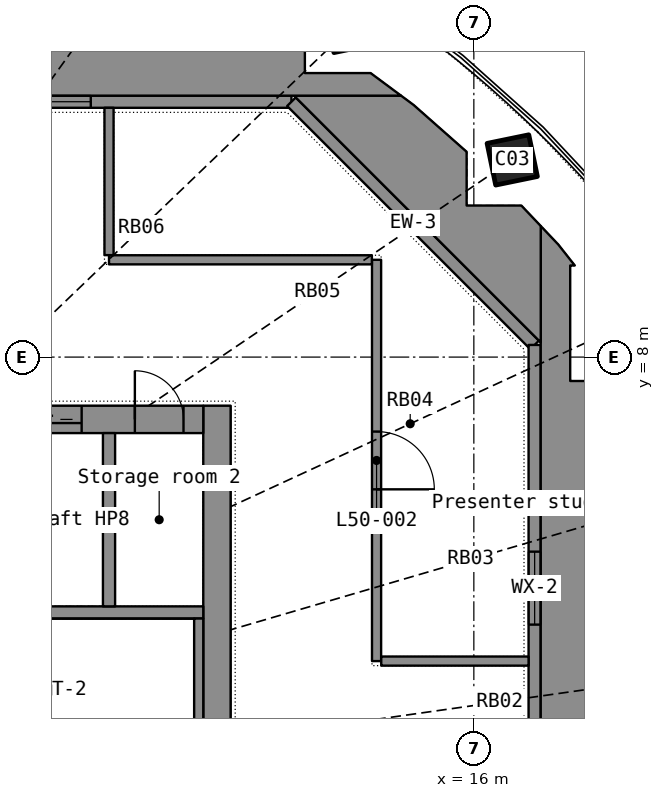
"""IFC4 building model, lengths in metres.
Left out: names, types, materials, properties, quantities, classifications, styles, units other than length and angle.
Written with IfcOpenShell. Run it as: python <this file> out.ifc"""

import sys

from ifc_helpers import new_model, si_unit, direction, frame, frame_2d, origin, origin_2d, place, context, subcontext, project, spatial, polyline, rectangle, hollow_rectangle, outline, extrude, element, fill, save


model = new_model("IFC4")
c1 = context("Model", 3, precision=1e-05, world=origin(), true_north=direction((0.0, 1.0)))
c2 = subcontext(c1, "Body", "Model", "MODEL_VIEW")
j1 = project(units=[si_unit("LENGTHUNIT", "METRE"), si_unit("PLANEANGLEUNIT", "RADIAN")], contexts=[c1])
p1 = place(None, origin())
s1 = spatial("IfcSite", under=j1, at=p1, CompositionType="ELEMENT")
p2 = place(p1, origin())
s2 = spatial("IfcBuilding", under=s1, at=p2, CompositionType="ELEMENT")
p3 = place(p2, frame((0.0, 0.0, 205.2)))
s3 = spatial("IfcBuildingStorey", under=s2, at=p3, CompositionType="ELEMENT", Elevation=205.2)
p4 = place(p3, frame((18.535, 8.557, 0.0), z_axis=(-0.029972624, -0.014178469, 0.999450155), x_axis=(0.583640912, -0.811989828, 0.005983767)))
e1 = element("IfcColumn", 1, at=p4, inside=s3, PredefinedType="COLUMN", context=c2, shape_type="SweptSolid", body=[
    extrude(hollow_rectangle(XDim=1.1, YDim=1.1, WallThickness=0.032, at=origin_2d()), origin(), (0.0, 0.0, 1.0), 7.404),
])
p5 = place(p3, frame((16.631, 11.243, 0.0), z_axis=(-0.026511305, -0.018201791, 0.999482789), x_axis=(0.720516136, -0.693407857, 0.006483911)))
e2 = element("IfcColumn", 2, at=p5, inside=s3, PredefinedType="COLUMN", context=c2, shape_type="SweptSolid", body=[
    extrude(hollow_rectangle(XDim=0.7, YDim=0.7, WallThickness=0.025, at=origin_2d()), origin(), (0.0, 0.0, 1.0), 7.404),
])
p6 = place(p3, frame((13.971, 13.421, 0.0), z_axis=(-0.022258382, -0.021697801, 0.999516768), x_axis=(0.828160065, -0.560456529, 0.006275862)))
e3 = element("IfcColumn", 3, at=p6, inside=s3, PredefinedType="COLUMN", context=c2, shape_type="SweptSolid", body=[
    extrude(hollow_rectangle(XDim=0.7, YDim=0.7, WallThickness=0.025, at=origin_2d()), origin(), (0.0, 0.0, 1.0), 7.404),
])
p7 = place(p3, frame((-13.0, 12.2, 0.08), z_axis=(0.0, 0.0, 1.0), x_axis=(1.0, 0.0, 0.0)))
e4 = element("IfcWall", 4, at=p7, inside=s3, PredefinedType="STANDARD", context=c2, shape_type="SweptSolid", body=[
    extrude(rectangle(XDim=26.0, YDim=0.2, at=frame_2d((13.0, 0.0))), origin(), (0.0, 0.0, 1.0), 7.12),
])
p8 = place(p7, frame((7.1, 0.0, 0.0)))
e5 = element("IfcOpeningElement", 5, at=p8, cuts=e4, PredefinedType="OPENING", context=c2, shape_type="SweptSolid", body=[
    extrude(rectangle(XDim=1.8, YDim=2.4, at=frame_2d((0.9, 1.2))), frame((0.0, 0.11, 0.0), z_axis=(0.0, -1.0, 0.0), x_axis=(1.0, 0.0, 0.0)), (0.0, 0.0, 1.0), 0.22),
])
p9 = place(p7, frame((17.1, 0.0, 0.0)))
e6 = element("IfcOpeningElement", 6, at=p9, cuts=e4, PredefinedType="OPENING", context=c2, shape_type="SweptSolid", body=[
    extrude(rectangle(XDim=1.8, YDim=2.4, at=frame_2d((0.9, 1.2))), frame((0.0, 0.11, 0.0), z_axis=(0.0, -1.0, 0.0), x_axis=(1.0, 0.0, 0.0)), (0.0, 0.0, 1.0), 0.22),
])
p10 = place(p7, frame((3.3, 0.0, 0.9)))
e7 = element("IfcOpeningElement", 7, at=p10, cuts=e4, PredefinedType="OPENING", context=c2, shape_type="SweptSolid", body=[
    extrude(rectangle(XDim=2.4, YDim=1.5, at=frame_2d((1.2, 0.75))), frame((0.0, 0.11, 0.0), z_axis=(0.0, -1.0, 0.0), x_axis=(1.0, 0.0, 0.0)), (0.0, 0.0, 1.0), 0.22),
])
p11 = place(p7, frame((11.8, 0.0, 0.9)))
e8 = element("IfcOpeningElement", 8, at=p11, cuts=e4, PredefinedType="OPENING", context=c2, shape_type="SweptSolid", body=[
    extrude(rectangle(XDim=2.4, YDim=1.5, at=frame_2d((1.2, 0.75))), frame((0.0, 0.11, 0.0), z_axis=(0.0, -1.0, 0.0), x_axis=(1.0, 0.0, 0.0)), (0.0, 0.0, 1.0), 0.22),
])
p12 = place(p7, frame((20.3, 0.0, 0.9)))
e9 = element("IfcOpeningElement", 9, at=p12, cuts=e4, PredefinedType="OPENING", context=c2, shape_type="SweptSolid", body=[
    extrude(rectangle(XDim=2.4, YDim=1.5, at=frame_2d((1.2, 0.75))), frame((0.0, 0.11, 0.0), z_axis=(0.0, -1.0, 0.0), x_axis=(1.0, 0.0, 0.0)), (0.0, 0.0, 1.0), 0.22),
])
p13 = place(p7, frame((6.5, 0.0, 3.2)))
e10 = element("IfcOpeningElement", 10, at=p13, cuts=e4, PredefinedType="OPENING", context=c2, shape_type="SweptSolid", body=[
    extrude(rectangle(XDim=3.0, YDim=1.0, at=frame_2d((1.5, 0.5))), frame((0.0, 0.11, 0.0), z_axis=(0.0, -1.0, 0.0), x_axis=(1.0, 0.0, 0.0)), (0.0, 0.0, 1.0), 0.22),
])
p14 = place(p7, frame((16.5, 0.0, 3.2)))
e11 = element("IfcOpeningElement", 11, at=p14, cuts=e4, PredefinedType="OPENING", context=c2, shape_type="SweptSolid", body=[
    extrude(rectangle(XDim=3.0, YDim=1.0, at=frame_2d((1.5, 0.5))), frame((0.0, 0.11, 0.0), z_axis=(0.0, -1.0, 0.0), x_axis=(1.0, 0.0, 0.0)), (0.0, 0.0, 1.0), 0.22),
])
p15 = place(p3, frame((13.0, 12.2, 0.08), z_axis=(0.0, 0.0, 1.0), x_axis=(0.707106781, -0.707106781, 0.0)))
e12 = element("IfcWall", 12, at=p15, inside=s3, PredefinedType="STANDARD", context=c2, shape_type="SweptSolid", body=[
    extrude(rectangle(XDim=5.657, YDim=0.2, at=frame_2d((2.828, 0.0))), origin(), (0.0, 0.0, 1.0), 7.12),
])
p16 = place(p3, frame((17.0, 8.2, 0.08), z_axis=(0.0, 0.0, 1.0), x_axis=(0.0, -1.0, 0.0)))
e13 = element("IfcWall", 13, at=p16, inside=s3, PredefinedType="STANDARD", context=c2, shape_type="SweptSolid", body=[
    extrude(rectangle(XDim=16.4, YDim=0.2, at=frame_2d((8.2, 0.0))), origin(), (0.0, 0.0, 1.0), 7.12),
])
p17 = place(p16, frame((7.3, 0.0, 0.0)))
e14 = element("IfcOpeningElement", 14, at=p17, cuts=e13, PredefinedType="OPENING", context=c2, shape_type="SweptSolid", body=[
    extrude(rectangle(XDim=1.8, YDim=2.4, at=frame_2d((0.9, 1.2))), frame((0.0, 0.11, 0.0), z_axis=(0.0, -1.0, 0.0), x_axis=(1.0, 0.0, 0.0)), (0.0, 0.0, 1.0), 0.22),
])
p18 = place(p16, frame((3.4, 0.0, 0.1)))
e15 = element("IfcOpeningElement", 15, at=p18, cuts=e13, PredefinedType="OPENING", context=c2, shape_type="SweptSolid", body=[
    extrude(rectangle(XDim=1.2, YDim=2.2, at=frame_2d((0.6, 1.1))), frame((0.0, 0.11, 0.0), z_axis=(0.0, -1.0, 0.0), x_axis=(1.0, 0.0, 0.0)), (0.0, 0.0, 1.0), 0.22),
])
p19 = place(p16, frame((11.8, 0.0, 0.1)))
e16 = element("IfcOpeningElement", 16, at=p19, cuts=e13, PredefinedType="OPENING", context=c2, shape_type="SweptSolid", body=[
    extrude(rectangle(XDim=1.2, YDim=2.2, at=frame_2d((0.6, 1.1))), frame((0.0, 0.11, 0.0), z_axis=(0.0, -1.0, 0.0), x_axis=(1.0, 0.0, 0.0)), (0.0, 0.0, 1.0), 0.22),
])
p20 = place(p3, frame((0.0, 0.0, -0.4)))
e17 = element("IfcWall", 17, at=p20, inside=s3, PredefinedType="ELEMENTEDWALL", context=c2, shape_type="SweptSolid", body=[
    extrude(outline(polyline([(17.1, 10.156), (17.1, 8.241), (17.1, 0.9), (20.39, 0.9), (20.39, 0.95), (21.175, 0.95), (21.145, 1.497), (21.019, 2.273), (20.567, 2.273), (20.567, 3.773), (20.687, 3.773), (20.503, 4.446), (20.205, 5.212), (19.606, 5.212), (19.606, 6.54), (19.237, 7.26), (19.014, 7.607), (17.585, 7.607), (17.585, 9.507), (17.66, 9.507), (17.387, 9.853), (17.1, 10.156)])), origin(), (0.0, 0.0, 1.0), 1.58),
])
p21 = place(p3, frame((0.0, 0.0, -0.4)))
e18 = element("IfcWall", 18, at=p21, inside=s3, PredefinedType="ELEMENTEDWALL", context=c2, shape_type="SweptSolid", body=[
    extrude(outline(polyline([(14.803, 12.3), (13.042, 12.3), (17.1, 8.241), (17.1, 10.156), (16.781, 10.493), (15.881, 10.493), (15.881, 11.377), (15.009, 12.147), (14.803, 12.3)])), origin(), (0.0, 0.0, 1.0), 1.58),
])
p22 = place(p3, frame((0.0, 0.0, -0.4)))
e19 = element("IfcWall", 19, at=p22, inside=s3, PredefinedType="ELEMENTEDWALL", context=c2, shape_type="SweptSolid", body=[
    extrude(outline(polyline([(8.97, 15.569), (8.196, 15.829), (8.196, 15.756), (6.696, 15.756), (6.696, 16.286), (5.9, 16.49), (5.9, 12.3), (13.042, 12.3), (14.803, 12.3), (14.302, 12.671), (13.221, 12.671), (13.221, 13.422), (12.175, 14.072), (11.7, 14.317), (11.7, 13.974), (9.8, 13.974), (9.8, 15.22), (8.97, 15.569)])), origin(), (0.0, 0.0, 1.0), 1.58),
])
p23 = place(p3, frame((11.775, -7.2, 0.0), z_axis=(0.0, 0.0, 1.0), x_axis=(0.0, 1.0, 0.0)))
e20 = element("IfcWall", 20, at=p23, inside=s3, PredefinedType="SHEAR", context=c2, shape_type="SweptSolid", body=[
    extrude(rectangle(XDim=14.4, YDim=0.45, at=frame_2d((7.2, 0.0))), origin(), (0.0, 0.0, 1.0), 7.0),
])
p24 = place(p23, frame((6.5, 0.0, 0.0)))
e21 = element("IfcOpeningElement", 21, at=p24, cuts=e20, PredefinedType="OPENING", context=c2, shape_type="SweptSolid", body=[
    extrude(rectangle(XDim=1.4, YDim=2.2, at=frame_2d((0.7, 1.1))), frame((0.0, 0.235, 0.0), z_axis=(0.0, -1.0, 0.0), x_axis=(1.0, 0.0, 0.0)), (0.0, 0.0, 1.0), 0.47),
])
p25 = place(p3, frame((-11.55, 6.975, 0.0), z_axis=(0.0, 0.0, 1.0), x_axis=(1.0, 0.0, 0.0)))
e22 = element("IfcWall", 22, at=p25, inside=s3, PredefinedType="SHEAR", context=c2, shape_type="SweptSolid", body=[
    extrude(rectangle(XDim=23.1, YDim=0.45, at=frame_2d((11.55, 0.0))), origin(), (0.0, 0.0, 1.0), 7.0),
])
p26 = place(p25, frame((2.0, 0.0, 0.0)))
e23 = element("IfcOpeningElement", 23, at=p26, cuts=e22, PredefinedType="OPENING", context=c2, shape_type="SweptSolid", body=[
    extrude(rectangle(XDim=1.1, YDim=2.2, at=frame_2d((0.55, 1.1))), frame((0.0, 0.235, 0.0), z_axis=(0.0, -1.0, 0.0), x_axis=(1.0, 0.0, 0.0)), (0.0, 0.0, 1.0), 0.47),
])
p27 = place(p25, frame((6.0, 0.0, 0.0)))
e24 = element("IfcOpeningElement", 24, at=p27, cuts=e22, PredefinedType="OPENING", context=c2, shape_type="SweptSolid", body=[
    extrude(rectangle(XDim=1.1, YDim=2.2, at=frame_2d((0.55, 1.1))), frame((0.0, 0.235, 0.0), z_axis=(0.0, -1.0, 0.0), x_axis=(1.0, 0.0, 0.0)), (0.0, 0.0, 1.0), 0.47),
])
p28 = place(p25, frame((8.0, 0.0, 0.0)))
e25 = element("IfcOpeningElement", 25, at=p28, cuts=e22, PredefinedType="OPENING", context=c2, shape_type="SweptSolid", body=[
    extrude(rectangle(XDim=1.1, YDim=2.2, at=frame_2d((0.55, 1.1))), frame((0.0, 0.235, 0.0), z_axis=(0.0, -1.0, 0.0), x_axis=(1.0, 0.0, 0.0)), (0.0, 0.0, 1.0), 0.47),
])
p29 = place(p25, frame((10.0, 0.0, 0.0)))
e26 = element("IfcOpeningElement", 26, at=p29, cuts=e22, PredefinedType="OPENING", context=c2, shape_type="SweptSolid", body=[
    extrude(rectangle(XDim=1.1, YDim=2.2, at=frame_2d((0.55, 1.1))), frame((0.0, 0.235, 0.0), z_axis=(0.0, -1.0, 0.0), x_axis=(1.0, 0.0, 0.0)), (0.0, 0.0, 1.0), 0.47),
])
p30 = place(p25, frame((12.0, 0.0, 0.0)))
e27 = element("IfcOpeningElement", 27, at=p30, cuts=e22, PredefinedType="OPENING", context=c2, shape_type="SweptSolid", body=[
    extrude(rectangle(XDim=1.1, YDim=2.2, at=frame_2d((0.55, 1.1))), frame((0.0, 0.235, 0.0), z_axis=(0.0, -1.0, 0.0), x_axis=(1.0, 0.0, 0.0)), (0.0, 0.0, 1.0), 0.47),
])
p31 = place(p25, frame((14.0, 0.0, 0.0)))
e28 = element("IfcOpeningElement", 28, at=p31, cuts=e22, PredefinedType="OPENING", context=c2, shape_type="SweptSolid", body=[
    extrude(rectangle(XDim=1.1, YDim=2.2, at=frame_2d((0.55, 1.1))), frame((0.0, 0.235, 0.0), z_axis=(0.0, -1.0, 0.0), x_axis=(1.0, 0.0, 0.0)), (0.0, 0.0, 1.0), 0.47),
])
p32 = place(p25, frame((16.0, 0.0, 0.0)))
e29 = element("IfcOpeningElement", 29, at=p32, cuts=e22, PredefinedType="OPENING", context=c2, shape_type="SweptSolid", body=[
    extrude(rectangle(XDim=1.1, YDim=2.2, at=frame_2d((0.55, 1.1))), frame((0.0, 0.235, 0.0), z_axis=(0.0, -1.0, 0.0), x_axis=(1.0, 0.0, 0.0)), (0.0, 0.0, 1.0), 0.47),
])
p33 = place(p25, frame((18.0, 0.0, 0.0)))
e30 = element("IfcOpeningElement", 30, at=p33, cuts=e22, PredefinedType="OPENING", context=c2, shape_type="SweptSolid", body=[
    extrude(rectangle(XDim=1.1, YDim=2.2, at=frame_2d((0.55, 1.1))), frame((0.0, 0.235, 0.0), z_axis=(0.0, -1.0, 0.0), x_axis=(1.0, 0.0, 0.0)), (0.0, 0.0, 1.0), 0.47),
])
p34 = place(p25, frame((20.0, 0.0, 0.0)))
e31 = element("IfcOpeningElement", 31, at=p34, cuts=e22, PredefinedType="OPENING", context=c2, shape_type="SweptSolid", body=[
    extrude(rectangle(XDim=1.1, YDim=2.2, at=frame_2d((0.55, 1.1))), frame((0.0, 0.235, 0.0), z_axis=(0.0, -1.0, 0.0), x_axis=(1.0, 0.0, 0.0)), (0.0, 0.0, 1.0), 0.47),
])
p35 = place(p25, frame((4.1, 0.0, 0.0)))
e32 = element("IfcOpeningElement", 32, at=p35, cuts=e22, PredefinedType="OPENING", context=c2, shape_type="SweptSolid", body=[
    extrude(rectangle(XDim=0.9, YDim=2.1, at=frame_2d((0.45, 1.05))), frame((0.0, 0.235, 0.0), z_axis=(0.0, -1.0, 0.0), x_axis=(1.0, 0.0, 0.0)), (0.0, 0.0, 1.0), 0.47),
])
p36 = place(p25, frame((0.325, 0.0, 0.0)))
e33 = element("IfcOpeningElement", 33, at=p36, cuts=e22, PredefinedType="OPENING", context=c2, shape_type="SweptSolid", body=[
    extrude(rectangle(XDim=0.8, YDim=2.05, at=frame_2d((0.4, 1.025))), frame((0.0, 0.235, 0.0), z_axis=(0.0, -1.0, 0.0), x_axis=(1.0, 0.0, 0.0)), (0.0, 0.0, 1.0), 0.47),
])
p37 = place(p25, frame((21.975, 0.0, 0.0)))
e34 = element("IfcOpeningElement", 34, at=p37, cuts=e22, PredefinedType="OPENING", context=c2, shape_type="SweptSolid", body=[
    extrude(rectangle(XDim=0.8, YDim=2.05, at=frame_2d((0.4, 1.025))), frame((0.0, 0.235, 0.0), z_axis=(0.0, -1.0, 0.0), x_axis=(1.0, 0.0, 0.0)), (0.0, 0.0, 1.0), 0.47),
])
p38 = place(p3, frame((-11.55, 3.8, 0.0), z_axis=(0.0, 0.0, 1.0), x_axis=(1.0, 0.0, 0.0)))
e35 = element("IfcWall", 35, at=p38, inside=s3, PredefinedType="SHEAR", context=c2, shape_type="SweptSolid", body=[
    extrude(rectangle(XDim=23.1, YDim=0.2, at=frame_2d((11.55, 0.0))), origin(), (0.0, 0.0, 1.0), 7.0),
])
p39 = place(p3, frame((10.0, 3.9, 0.0), z_axis=(0.0, 0.0, 1.0), x_axis=(0.0, 1.0, 0.0)))
e36 = element("IfcWall", 36, at=p39, inside=s3, PredefinedType="SHEAR", context=c2, shape_type="SweptSolid", body=[
    extrude(rectangle(XDim=2.85, YDim=0.2, at=frame_2d((1.425, 0.0))), origin(), (0.0, 0.0, 1.0), 7.0),
])
p40 = place(p3, frame((11.475, 1.35, 0.0), z_axis=(0.0, 0.0, 1.0), x_axis=(0.0, 1.0, 0.0)))
e37 = element("IfcWall", 37, at=p40, inside=s3, PredefinedType="SHEAR", context=c2, shape_type="SweptSolid", body=[
    extrude(rectangle(XDim=2.35, YDim=0.15, at=frame_2d((1.175, 0.0))), origin(), (0.0, 0.0, 1.0), 7.0),
])
p41 = place(p3, frame((14.4, 9.6, 0.0), z_axis=(0.0, 0.0, 1.0), x_axis=(0.0, -1.0, 0.0)))
e38 = element("IfcWall", 38, at=p41, inside=s3, PredefinedType="PARTITIONING", context=c2, shape_type="SweptSolid", body=[
    extrude(rectangle(XDim=6.6, YDim=0.15, at=frame_2d((3.3, 0.0))), origin(), (0.0, 0.0, 1.0), 6.1),
])
p42 = place(p41, frame((2.825, 0.0, 0.0)))
e39 = element("IfcOpeningElement", 39, at=p42, cuts=e38, PredefinedType="OPENING", context=c2, shape_type="SweptSolid", body=[
    extrude(rectangle(XDim=0.95, YDim=2.15, at=frame_2d((0.475, 1.075))), frame((0.0, 0.085, 0.0), z_axis=(0.0, -1.0, 0.0), x_axis=(1.0, 0.0, 0.0)), (0.0, 0.0, 1.0), 0.17),
])
p43 = place(p3, frame((10.0, 9.6, 0.0), z_axis=(0.0, 0.0, 1.0), x_axis=(1.0, 0.0, 0.0)))
e40 = element("IfcWall", 40, at=p43, inside=s3, PredefinedType="PARTITIONING", context=c2, shape_type="SweptSolid", body=[
    extrude(rectangle(XDim=4.323, YDim=0.15, at=frame_2d((2.162, 0.0))), origin(), (0.0, 0.0, 1.0), 6.1),
])
p44 = place(p3, frame((10.0, 12.1, 0.0), z_axis=(0.0, 0.0, 1.0), x_axis=(0.0, -1.0, 0.0)))
e41 = element("IfcWall", 41, at=p44, inside=s3, PredefinedType="PARTITIONING", context=c2, shape_type="SweptSolid", body=[
    extrude(rectangle(XDim=2.423, YDim=0.15, at=frame_2d((1.211, 0.0))), origin(), (0.0, 0.0, 1.0), 6.1),
])
p45 = place(p3, frame((14.477, 3.0, 0.0), z_axis=(0.0, 0.0, 1.0), x_axis=(1.0, 0.0, 0.0)))
e42 = element("IfcWall", 42, at=p45, inside=s3, PredefinedType="PARTITIONING", context=c2, shape_type="SweptSolid", body=[
    extrude(rectangle(XDim=2.423, YDim=0.15, at=frame_2d((1.211, 0.0))), origin(), (0.0, 0.0, 1.0), 6.1),
])
p46 = place(p12, origin())
e43 = element("IfcWindow", 43, at=p46, inside=s3, PartitioningType="SINGLE_PANEL", PredefinedType="WINDOW", context=c2, shape_type="SweptSolid", body=[
    extrude(rectangle(XDim=2.4, YDim=1.5, at=frame_2d((1.2, 0.75))), frame((0.0, 0.03, 0.0), z_axis=(0.0, -1.0, 0.0), x_axis=(1.0, 0.0, 0.0)), (0.0, 0.0, 1.0), 0.06),
])
fill(e9, e43)
p47 = place(p18, origin())
e44 = element("IfcWindow", 44, at=p47, inside=s3, PartitioningType="SINGLE_PANEL", PredefinedType="WINDOW", context=c2, shape_type="SweptSolid", body=[
    extrude(rectangle(XDim=1.2, YDim=2.2, at=frame_2d((0.6, 1.1))), frame((0.0, 0.03, 0.0), z_axis=(0.0, -1.0, 0.0), x_axis=(1.0, 0.0, 0.0)), (0.0, 0.0, 1.0), 0.06),
])
fill(e15, e44)
p48 = place(p34, origin())
e45 = element("IfcDoor", 45, at=p48, inside=s3, OperationType="DOUBLE_DOOR_SLIDING", PredefinedType="DOOR", context=c2, shape_type="SweptSolid", body=[
    extrude(rectangle(XDim=1.1, YDim=2.2, at=frame_2d((0.55, 1.1))), frame((0.0, 0.025, 0.0), z_axis=(0.0, -1.0, 0.0), x_axis=(1.0, 0.0, 0.0)), (0.0, 0.0, 1.0), 0.05),
])
fill(e31, e45)
p49 = place(p37, origin())
e46 = element("IfcDoor", 46, at=p49, inside=s3, OperationType="SINGLE_SWING_LEFT", PredefinedType="DOOR", context=c2, shape_type="SweptSolid", body=[
    extrude(rectangle(XDim=0.8, YDim=2.05, at=frame_2d((0.4, 1.025))), frame((0.0, 0.025, 0.0), z_axis=(0.0, -1.0, 0.0), x_axis=(1.0, 0.0, 0.0)), (0.0, 0.0, 1.0), 0.05),
])
fill(e34, e46)
p50 = place(p42, origin())
e47 = element("IfcDoor", 47, at=p50, inside=s3, OperationType="SINGLE_SWING_RIGHT", PredefinedType="DOOR", context=c2, shape_type="SweptSolid", body=[
    extrude(rectangle(XDim=0.95, YDim=2.15, at=frame_2d((0.475, 1.075))), frame((0.0, 0.025, 0.0), z_axis=(0.0, -1.0, 0.0), x_axis=(1.0, 0.0, 0.0)), (0.0, 0.0, 1.0), 0.05),
])
fill(e39, e47)
save(model, sys.argv[1])
